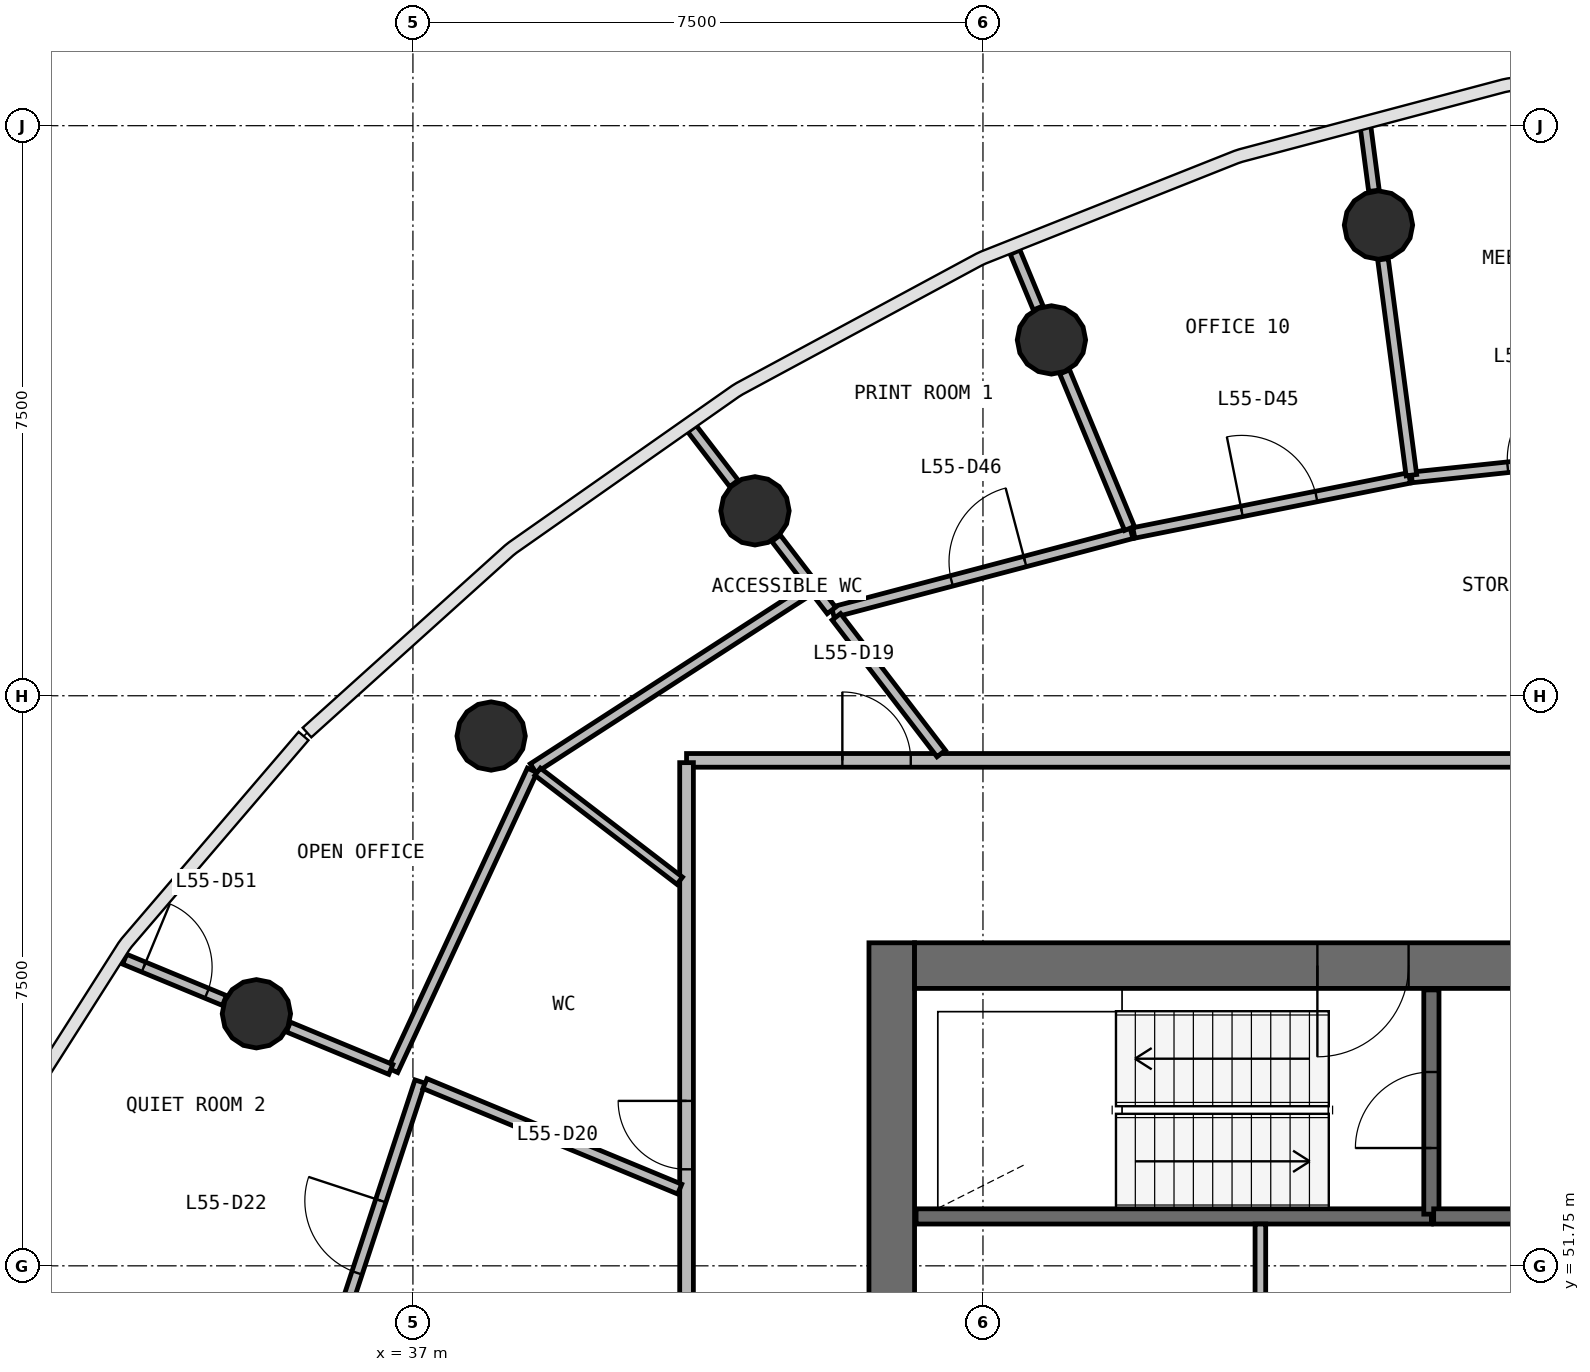
"""IFC4 building model, lengths in metres.
Left out: names, types, materials, properties, quantities, classifications, styles, units other than length and angle.
Written with IfcOpenShell. Run it as: python <this file> out.ifc"""

import sys

from ifc_helpers import new_model, si_unit, direction, frame, frame_2d, origin, origin_2d, place, context, subcontext, project, spatial, rectangle, circle, extrude, source, transform, mapped, element, fill, save


model = new_model("IFC4")
c1 = context("Model", 3, precision=1e-05, world=origin(), true_north=direction((0.0, 1.0)))
c2 = subcontext(c1, "Body", "Model", "MODEL_VIEW")
j1 = project(units=[si_unit("LENGTHUNIT", "METRE"), si_unit("PLANEANGLEUNIT", "RADIAN")], contexts=[c1])
p1 = place(None, origin())
s1 = spatial("IfcSite", under=j1, at=p1, CompositionType="ELEMENT")
p2 = place(p1, origin())
s2 = spatial("IfcBuilding", under=s1, at=p2, CompositionType="ELEMENT")
p3 = place(p2, frame((0.0, 0.0, 226.7)))
s3 = spatial("IfcBuildingStorey", under=s2, at=p3, CompositionType="ELEMENT", Elevation=226.7)
p4 = place(p3, frame((43.3, 56.0, 0.0), z_axis=(0.0, 0.0, 1.0), x_axis=(0.0, -1.0, 0.0)))
e1 = element("IfcWall", 1, at=p4, inside=s3, PredefinedType="SHEAR", context=c2, shape_type="SweptSolid", body=[
    extrude(rectangle(XDim=16.0, YDim=0.6, at=frame_2d((8.0, 0.0))), origin(), (0.0, 0.0, 1.0), 3.9),
])
p5 = place(p4, frame((7.1, 0.0, 0.0)))
e2 = element("IfcOpeningElement", 2, at=p5, cuts=e1, PredefinedType="OPENING", context=c2, shape_type="SweptSolid", body=[
    extrude(rectangle(XDim=1.8, YDim=2.1, at=frame_2d((0.9, 1.05))), frame((0.0, 0.31, 0.0), z_axis=(0.0, -1.0, 0.0), x_axis=(1.0, 0.0, 0.0)), (0.0, 0.0, 1.0), 0.62),
])
p6 = place(p3, frame((60.4, 55.7, 0.0), z_axis=(0.0, 0.0, 1.0), x_axis=(-1.0, 0.0, 0.0)))
e3 = element("IfcWall", 3, at=p6, inside=s3, PredefinedType="SHEAR", context=c2, shape_type="SweptSolid", body=[
    extrude(rectangle(XDim=16.8, YDim=0.6, at=frame_2d((8.4, 0.0))), origin(), (0.0, 0.0, 1.0), 3.9),
])
p7 = place(p6, frame((0.4, 0.0, 0.0)))
e4 = element("IfcOpeningElement", 4, at=p7, cuts=e3, PredefinedType="OPENING", context=c2, shape_type="SweptSolid", body=[
    extrude(rectangle(XDim=1.1, YDim=2.1, at=frame_2d((0.55, 1.05))), frame((0.0, 0.31, 0.0), z_axis=(0.0, -1.0, 0.0), x_axis=(1.0, 0.0, 0.0)), (0.0, 0.0, 1.0), 0.62),
])
p8 = place(p6, frame((10.3, 0.0, 0.0)))
e5 = element("IfcOpeningElement", 5, at=p8, cuts=e3, PredefinedType="OPENING", context=c2, shape_type="SweptSolid", body=[
    extrude(rectangle(XDim=1.2, YDim=2.1, at=frame_2d((0.6, 1.05))), frame((0.0, 0.31, 0.0), z_axis=(0.0, -1.0, 0.0), x_axis=(1.0, 0.0, 0.0)), (0.0, 0.0, 1.0), 0.62),
])
p9 = place(p6, frame((7.25, 0.0, 0.0)))
e6 = element("IfcOpeningElement", 6, at=p9, cuts=e3, PredefinedType="OPENING", context=c2, shape_type="SweptSolid", body=[
    extrude(rectangle(XDim=1.1, YDim=2.1, at=frame_2d((0.55, 1.05))), frame((0.0, 0.31, 0.0), z_axis=(0.0, -1.0, 0.0), x_axis=(1.0, 0.0, 0.0)), (0.0, 0.0, 1.0), 0.62),
])
m1 = source(origin(), c2, "Body", "SweptSolid", [
    extrude(circle(Radius=0.45, at=origin_2d()), origin(), (0.0, 0.0, 1.0), 3.9),
])
for number, where, z_axis, x_axis in (
    (7, (49.704, 65.442, 0.0), (0.0, 0.0, 1.0), (1.0, 0.0, 0.0)),
    (8, (45.401, 63.931, 0.0), (0.0, 0.0, 1.0), (1.0, 0.0, 0.0)),
    (9, (41.501, 61.683, 0.0), (0.0, 0.0, 1.0), (1.0, 0.0, 0.0)),
    (10, (38.029, 58.72, 0.0), (0.0, 0.0, 1.0), (1.0, 0.0, 0.0)),
    (11, (34.941, 55.066, 0.0), (0.0, 0.0, 1.0), (1.0, 0.0, 0.0)),
):
    element("IfcColumn", number, at=place(p3, frame(where, z_axis=z_axis, x_axis=x_axis)), inside=s3, PredefinedType="COLUMN", context=c2, shape_type="MappedRepresentation", body=[
        mapped(m1, transform((0.0, 0.0, 0.0), scale=1.0)),
    ])
p10 = place(p3, frame((43.62, 52.4, 0.0), z_axis=(0.0, 0.0, 1.0), x_axis=(1.0, 0.0, 0.0)))
e12 = element("IfcWall", 12, at=p10, inside=s3, PredefinedType="SOLIDWALL", context=c2, shape_type="SweptSolid", body=[
    extrude(rectangle(XDim=6.78, YDim=0.2, at=frame_2d((3.39, 0.0))), origin(), (0.0, 0.0, 1.0), 3.4),
])
p11 = place(p3, frame((50.4, 52.43, 0.0), z_axis=(0.0, 0.0, 1.0), x_axis=(0.0, 1.0, 0.0)))
e13 = element("IfcWall", 13, at=p11, inside=s3, PredefinedType="SOLIDWALL", context=c2, shape_type="SweptSolid", body=[
    extrude(rectangle(XDim=2.95, YDim=0.2, at=frame_2d((1.475, 0.0))), origin(), (0.0, 0.0, 1.0), 3.4),
])
p12 = place(p11, frame((0.87, 0.0, 0.0)))
e14 = element("IfcOpeningElement", 14, at=p12, cuts=e13, PredefinedType="OPENING", context=c2, shape_type="SweptSolid", body=[
    extrude(rectangle(XDim=1.0, YDim=2.1, at=frame_2d((0.5, 1.05))), frame((0.0, 0.11, 0.0), z_axis=(0.0, -1.0, 0.0), x_axis=(1.0, 0.0, 0.0)), (0.0, 0.0, 1.0), 0.22),
])
p13 = place(p3, frame((50.43, 52.4, 0.0), z_axis=(0.0, 0.0, 1.0), x_axis=(1.0, 0.0, 0.0)))
e15 = element("IfcWall", 15, at=p13, inside=s3, PredefinedType="SOLIDWALL", context=c2, shape_type="SweptSolid", body=[
    extrude(rectangle(XDim=2.24, YDim=0.2, at=frame_2d((1.12, 0.0))), origin(), (0.0, 0.0, 1.0), 3.4),
])
p14 = place(p3, frame((40.6, 58.4, 0.0), z_axis=(0.0, 0.0, 1.0), x_axis=(1.0, 0.0, 0.0)))
e16 = element("IfcWall", 16, at=p14, inside=s3, PredefinedType="PARTITIONING", context=c2, shape_type="SweptSolid", body=[
    extrude(rectangle(XDim=22.8, YDim=0.18, at=frame_2d((11.4, 0.0))), origin(), (0.0, 0.0, 1.0), 2.7),
])
p15 = place(p14, frame((2.05, 0.0, 0.0)))
e17 = element("IfcOpeningElement", 17, at=p15, cuts=e16, PredefinedType="OPENING", context=c2, shape_type="SweptSolid", body=[
    extrude(rectangle(XDim=0.9, YDim=2.1, at=frame_2d((0.45, 1.05))), frame((0.0, 0.1, 0.0), z_axis=(0.0, -1.0, 0.0), x_axis=(1.0, 0.0, 0.0)), (0.0, 0.0, 1.0), 0.2),
])
p16 = place(p14, frame((12.95, 0.0, 0.0)))
e18 = element("IfcOpeningElement", 18, at=p16, cuts=e16, PredefinedType="OPENING", context=c2, shape_type="SweptSolid", body=[
    extrude(rectangle(XDim=1.0, YDim=2.1, at=frame_2d((0.5, 1.05))), frame((0.0, 0.1, 0.0), z_axis=(0.0, -1.0, 0.0), x_axis=(1.0, 0.0, 0.0)), (0.0, 0.0, 1.0), 0.2),
])
p17 = place(p14, frame((10.95, 0.0, 0.0)))
e19 = element("IfcOpeningElement", 19, at=p17, cuts=e16, PredefinedType="OPENING", context=c2, shape_type="SweptSolid", body=[
    extrude(rectangle(XDim=1.0, YDim=2.1, at=frame_2d((0.5, 1.05))), frame((0.0, 0.1, 0.0), z_axis=(0.0, -1.0, 0.0), x_axis=(1.0, 0.0, 0.0)), (0.0, 0.0, 1.0), 0.2),
])
p18 = place(p3, frame((40.6, 37.63, 0.0), z_axis=(0.0, 0.0, 1.0), x_axis=(0.0, 1.0, 0.0)))
e20 = element("IfcWall", 20, at=p18, inside=s3, PredefinedType="PARTITIONING", context=c2, shape_type="SweptSolid", body=[
    extrude(rectangle(XDim=20.74, YDim=0.18, at=frame_2d((10.37, 0.0))), origin(), (0.0, 0.0, 1.0), 2.7),
])
p19 = place(p18, frame((15.39, 0.0, 0.0)))
e21 = element("IfcOpeningElement", 21, at=p19, cuts=e20, PredefinedType="OPENING", context=c2, shape_type="SweptSolid", body=[
    extrude(rectangle(XDim=0.9, YDim=2.1, at=frame_2d((0.45, 1.05))), frame((0.0, 0.1, 0.0), z_axis=(0.0, -1.0, 0.0), x_axis=(1.0, 0.0, 0.0)), (0.0, 0.0, 1.0), 0.2),
])
p20 = place(p18, frame((9.89, 0.0, 0.0)))
e22 = element("IfcOpeningElement", 22, at=p20, cuts=e20, PredefinedType="OPENING", context=c2, shape_type="SweptSolid", body=[
    extrude(rectangle(XDim=1.0, YDim=2.1, at=frame_2d((0.5, 1.05))), frame((0.0, 0.1, 0.0), z_axis=(0.0, -1.0, 0.0), x_axis=(1.0, 0.0, 0.0)), (0.0, 0.0, 1.0), 0.2),
])
p21 = place(p3, frame((42.27, 60.68, 0.0), z_axis=(0.0, 0.0, 1.0), x_axis=(-0.839801255045, -0.542893960202, 0.0)))
e23 = element("IfcWall", 23, at=p21, inside=s3, PredefinedType="PARTITIONING", context=c2, shape_type="SweptSolid", body=[
    extrude(rectangle(XDim=4.392, YDim=0.14, at=frame_2d((2.196, 0.0))), origin(), (0.0, 0.0, 1.0), 2.7),
])
p22 = place(p3, frame((38.569, 58.269, 0.0), z_axis=(0.0, 0.0, 1.0), x_axis=(-0.421127790684, -0.907001314174, 0.0)))
e24 = element("IfcWall", 24, at=p22, inside=s3, PredefinedType="PARTITIONING", context=c2, shape_type="SweptSolid", body=[
    extrude(rectangle(XDim=4.352, YDim=0.14, at=frame_2d((2.176, 0.0))), origin(), (0.0, 0.0, 1.0), 2.7),
])
p23 = place(p3, frame((35.774, 50.166, 0.0), z_axis=(0.0, 0.0, 1.0), x_axis=(0.312511306012, 0.949914040119, 0.0)))
e25 = element("IfcWall", 25, at=p23, inside=s3, PredefinedType="PARTITIONING", context=c2, shape_type="SweptSolid", body=[
    extrude(rectangle(XDim=4.22, YDim=0.14, at=frame_2d((2.11, 0.0))), origin(), (0.0, 0.0, 1.0), 2.7),
])
p24 = place(p23, frame((1.57, 0.0, 0.0)))
e26 = element("IfcOpeningElement", 26, at=p24, cuts=e25, PredefinedType="OPENING", context=c2, shape_type="SweptSolid", body=[
    extrude(rectangle(XDim=1.0, YDim=2.1, at=frame_2d((0.5, 1.05))), frame((0.0, 0.08, 0.0), z_axis=(0.0, -1.0, 0.0), x_axis=(1.0, 0.0, 0.0)), (0.0, 0.0, 1.0), 0.16),
])
p25 = place(p3, frame((42.524, 60.349, 0.0), z_axis=(0.0, 0.0, 1.0), x_axis=(0.966913320751, 0.255105135492, 0.0)))
e27 = element("IfcWall", 27, at=p25, inside=s3, PredefinedType="PARTITIONING", context=c2, shape_type="SweptSolid", body=[
    extrude(rectangle(XDim=4.065, YDim=0.14, at=frame_2d((2.033, 0.0))), origin(), (0.0, 0.0, 1.0), 2.7),
])
p26 = place(p25, frame((1.615, 0.0, 0.0)))
e28 = element("IfcOpeningElement", 28, at=p26, cuts=e27, PredefinedType="OPENING", context=c2, shape_type="SweptSolid", body=[
    extrude(rectangle(XDim=1.0, YDim=2.1, at=frame_2d((0.5, 1.05))), frame((0.0, 0.08, 0.0), z_axis=(0.0, -1.0, 0.0), x_axis=(1.0, 0.0, 0.0)), (0.0, 0.0, 1.0), 0.16),
])
p27 = place(p3, frame((40.51, 52.759, 0.0), z_axis=(0.0, 0.0, 1.0), x_axis=(-0.923873298868, 0.382698481365, 0.0)))
e29 = element("IfcWall", 29, at=p27, inside=s3, PredefinedType="PARTITIONING", context=c2, shape_type="SweptSolid", body=[
    extrude(rectangle(XDim=3.628, YDim=0.14, at=frame_2d((1.814, 0.0))), origin(), (0.0, 0.0, 1.0), 2.7),
])
p28 = place(p3, frame((50.141, 62.122, 0.0), z_axis=(0.0, 0.0, 1.0), x_axis=(0.994443424191, 0.105272389942, 0.0)))
e30 = element("IfcWall", 30, at=p28, inside=s3, PredefinedType="PARTITIONING", context=c2, shape_type="SweptSolid", body=[
    extrude(rectangle(XDim=3.72, YDim=0.14, at=frame_2d((1.86, 0.0))), origin(), (0.0, 0.0, 1.0), 2.7),
])
p29 = place(p28, frame((1.27, 0.0, 0.0)))
e31 = element("IfcOpeningElement", 31, at=p29, cuts=e30, PredefinedType="OPENING", context=c2, shape_type="SweptSolid", body=[
    extrude(rectangle(XDim=1.0, YDim=2.1, at=frame_2d((0.5, 1.05))), frame((0.0, 0.08, 0.0), z_axis=(0.0, -1.0, 0.0), x_axis=(1.0, 0.0, 0.0)), (0.0, 0.0, 1.0), 0.16),
])
p30 = place(p3, frame((46.485, 61.392, 0.0), z_axis=(0.0, 0.0, 1.0), x_axis=(0.980631422481, 0.195862230259, 0.0)))
e32 = element("IfcWall", 32, at=p30, inside=s3, PredefinedType="PARTITIONING", context=c2, shape_type="SweptSolid", body=[
    extrude(rectangle(XDim=3.698, YDim=0.14, at=frame_2d((1.849, 0.0))), origin(), (0.0, 0.0, 1.0), 2.7),
])
p31 = place(p30, frame((1.448, 0.0, 0.0)))
e33 = element("IfcOpeningElement", 33, at=p31, cuts=e32, PredefinedType="OPENING", context=c2, shape_type="SweptSolid", body=[
    extrude(rectangle(XDim=1.0, YDim=2.1, at=frame_2d((0.5, 1.05))), frame((0.0, 0.08, 0.0), z_axis=(0.0, -1.0, 0.0), x_axis=(1.0, 0.0, 0.0)), (0.0, 0.0, 1.0), 0.16),
])
p32 = place(p3, frame((50.137, 62.152, 0.0), z_axis=(0.0, 0.0, 1.0), x_axis=(-0.130577981436, 0.991438041818, 0.0)))
e34 = element("IfcWall", 34, at=p32, inside=s3, PredefinedType="PARTITIONING", context=c2, shape_type="SweptSolid", body=[
    extrude(rectangle(XDim=2.864, YDim=0.14, at=frame_2d((1.432, 0.0))), origin(), (0.0, 0.0, 1.0), 2.7),
])
p33 = place(p3, frame((43.951, 58.49, 0.0), z_axis=(0.0, 0.0, 1.0), x_axis=(-0.608700561504, 0.793400041861, 0.0)))
e35 = element("IfcWall", 35, at=p33, inside=s3, PredefinedType="PARTITIONING", context=c2, shape_type="SweptSolid", body=[
    extrude(rectangle(XDim=2.267, YDim=0.14, at=frame_2d((1.133, 0.0))), origin(), (0.0, 0.0, 1.0), 2.7),
])
p34 = place(p3, frame((48.15, 50.01, 0.0), z_axis=(0.0, 0.0, 1.0), x_axis=(0.0, 1.0, 0.0)))
e36 = element("IfcWall", 36, at=p34, inside=s3, PredefinedType="PARTITIONING", context=c2, shape_type="SweptSolid", body=[
    extrude(rectangle(XDim=2.29, YDim=0.14, at=frame_2d((1.145, 0.0))), origin(), (0.0, 0.0, 1.0), 2.7),
])
p35 = place(p3, frame((46.428, 61.451, 0.0), z_axis=(0.0, 0.0, 1.0), x_axis=(-0.382654863797, 0.923891365482, 0.0)))
e37 = element("IfcWall", 37, at=p35, inside=s3, PredefinedType="PARTITIONING", context=c2, shape_type="SweptSolid", body=[
    extrude(rectangle(XDim=2.229, YDim=0.14, at=frame_2d((1.115, 0.0))), origin(), (0.0, 0.0, 1.0), 2.7),
])
p36 = place(p3, frame((36.709, 54.334, 0.0), z_axis=(0.0, 0.0, 1.0), x_axis=(-0.923872023258, 0.382701560803, 0.0)))
e38 = element("IfcWall", 38, at=p36, inside=s3, PredefinedType="PARTITIONING", context=c2, shape_type="SweptSolid", body=[
    extrude(rectangle(XDim=1.459, YDim=0.14, at=frame_2d((0.729, 0.0))), origin(), (0.0, 0.0, 1.0), 2.7),
])
p37 = place(p3, frame((33.207, 55.784, 0.0), z_axis=(0.0, 0.0, 1.0), x_axis=(0.923908003556, -0.382614689949, 0.0)))
e39 = element("IfcWall", 39, at=p37, inside=s3, PredefinedType="PARTITIONING", context=c2, shape_type="SweptSolid", body=[
    extrude(rectangle(XDim=1.422, YDim=0.14, at=frame_2d((0.711, 0.0))), origin(), (0.0, 0.0, 1.0), 2.7),
])
p38 = place(p37, frame((0.272, 0.0, 0.0)))
e40 = element("IfcOpeningElement", 40, at=p38, cuts=e39, PredefinedType="OPENING", context=c2, shape_type="SweptSolid", body=[
    extrude(rectangle(XDim=0.9, YDim=2.1, at=frame_2d((0.45, 1.05))), frame((0.0, 0.08, 0.0), z_axis=(0.0, -1.0, 0.0), x_axis=(1.0, 0.0, 0.0)), (0.0, 0.0, 1.0), 0.16),
])
p39 = place(p3, frame((41.224, 62.044, 0.0), z_axis=(0.0, 0.0, 1.0), x_axis=(-0.608826656725, 0.793303285044, 0.0)))
e41 = element("IfcWall", 41, at=p39, inside=s3, PredefinedType="PARTITIONING", context=c2, shape_type="SweptSolid", body=[
    extrude(rectangle(XDim=0.908, YDim=0.14, at=frame_2d((0.454, 0.0))), origin(), (0.0, 0.0, 1.0), 2.7),
])
p40 = place(p3, frame((49.644, 65.893, 0.0), z_axis=(0.0, 0.0, 1.0), x_axis=(-0.130469380283, 0.991452339151, 0.0)))
e42 = element("IfcWall", 42, at=p40, inside=s3, PredefinedType="PARTITIONING", context=c2, shape_type="SweptSolid", body=[
    extrude(rectangle(XDim=0.85, YDim=0.14, at=frame_2d((0.425, 0.0))), origin(), (0.0, 0.0, 1.0), 2.7),
])
p41 = place(p3, frame((42.227, 60.736, 0.0), z_axis=(0.0, 0.0, 1.0), x_axis=(-0.608736601205, 0.793372390718, 0.0)))
e43 = element("IfcWall", 43, at=p41, inside=s3, PredefinedType="PARTITIONING", context=c2, shape_type="SweptSolid", body=[
    extrude(rectangle(XDim=0.739, YDim=0.14, at=frame_2d((0.37, 0.0))), origin(), (0.0, 0.0, 1.0), 2.7),
])
p42 = place(p3, frame((45.227, 64.352, 0.0), z_axis=(0.0, 0.0, 1.0), x_axis=(-0.382631826792, 0.923900906551, 0.0)))
e44 = element("IfcWall", 44, at=p42, inside=s3, PredefinedType="PARTITIONING", context=c2, shape_type="SweptSolid", body=[
    extrude(rectangle(XDim=0.796, YDim=0.14, at=frame_2d((0.398, 0.0))), origin(), (0.0, 0.0, 1.0), 2.7),
])
p43 = place(p3, frame((42.506, 60.373, 0.0), z_axis=(0.0, 0.0, 1.0), x_axis=(-0.609018395773, 0.793156096623, 0.0)))
e45 = element("IfcWall", 45, at=p43, inside=s3, PredefinedType="PARTITIONING", context=c2, shape_type="SweptSolid", body=[
    extrude(rectangle(XDim=0.358, YDim=0.14, at=frame_2d((0.179, 0.0))), origin(), (0.0, 0.0, 1.0), 2.7),
])
p44 = place(p3, frame((40.51, 56.817, 0.0), z_axis=(0.0, 0.0, 1.0), x_axis=(-0.793374494853, 0.608733858856, 0.0)))
e46 = element("IfcWall", 46, at=p44, inside=s3, PredefinedType="PARTITIONING", context=c2, shape_type="SweptSolid", body=[
    extrude(rectangle(XDim=2.356, YDim=0.12, at=frame_2d((1.178, 0.0))), origin(), (0.0, 0.0, 1.0), 2.7),
])
m2 = source(origin(), c2, "Body", "SweptSolid", [
    extrude(rectangle(XDim=1.2, YDim=2.1, at=frame_2d((0.6, 1.05))), frame((0.0, 0.025, 0.0), z_axis=(0.0, -1.0, 0.0), x_axis=(1.0, 0.0, 0.0)), (0.0, 0.0, 1.0), 0.05),
])
p45 = place(p8, origin())
e47 = element("IfcDoor", 47, at=p45, inside=s3, OperationType="SINGLE_SWING_RIGHT", PredefinedType="DOOR", context=c2, shape_type="MappedRepresentation", body=[
    mapped(m2, transform((0.0, 0.0, 0.0), scale=1.0)),
])
fill(e5, e47)
m3 = source(origin(), c2, "Body", "SweptSolid", [
    extrude(rectangle(XDim=1.0, YDim=2.1, at=frame_2d((0.5, 1.05))), frame((0.0, 0.025, 0.0), z_axis=(0.0, -1.0, 0.0), x_axis=(1.0, 0.0, 0.0)), (0.0, 0.0, 1.0), 0.05),
])
p46 = place(p12, origin())
e48 = element("IfcDoor", 48, at=p46, inside=s3, OperationType="SINGLE_SWING_LEFT", PredefinedType="DOOR", context=c2, shape_type="MappedRepresentation", body=[
    mapped(m3, transform((0.0, 0.0, 0.0), scale=1.0)),
])
fill(e14, e48)
m4 = source(origin(), c2, "Body", "SweptSolid", [
    extrude(rectangle(XDim=0.9, YDim=2.1, at=frame_2d((0.45, 1.05))), frame((0.0, 0.025, 0.0), z_axis=(0.0, -1.0, 0.0), x_axis=(1.0, 0.0, 0.0)), (0.0, 0.0, 1.0), 0.05),
])
p47 = place(p15, origin())
e49 = element("IfcDoor", 49, at=p47, inside=s3, OperationType="SINGLE_SWING_LEFT", PredefinedType="DOOR", context=c2, shape_type="MappedRepresentation", body=[
    mapped(m4, transform((0.0, 0.0, 0.0), scale=1.0)),
])
fill(e17, e49)
p48 = place(p19, origin())
e50 = element("IfcDoor", 50, at=p48, inside=s3, OperationType="SINGLE_SWING_RIGHT", PredefinedType="DOOR", context=c2, shape_type="MappedRepresentation", body=[
    mapped(m4, transform((0.0, 0.0, 0.0), scale=1.0)),
])
fill(e21, e50)
m5 = source(origin(), c2, "Body", "SweptSolid", [
    extrude(rectangle(XDim=1.0, YDim=2.1, at=frame_2d((0.5, 1.05))), frame((0.0, 0.025, 0.0), z_axis=(0.0, -1.0, 0.0), x_axis=(1.0, 0.0, 0.0)), (0.0, 0.0, 1.0), 0.05),
])
p49 = place(p24, origin())
e51 = element("IfcDoor", 51, at=p49, inside=s3, OperationType="SINGLE_SWING_RIGHT", PredefinedType="DOOR", context=c2, shape_type="MappedRepresentation", body=[
    mapped(m5, transform((0.0, 0.0, 0.0), scale=1.0)),
])
fill(e26, e51)
p50 = place(p29, origin())
e52 = element("IfcDoor", 52, at=p50, inside=s3, OperationType="SINGLE_SWING_RIGHT", PredefinedType="DOOR", context=c2, shape_type="MappedRepresentation", body=[
    mapped(m5, transform((0.0, 0.0, 0.0), scale=1.0)),
])
fill(e31, e52)
p51 = place(p31, origin())
e53 = element("IfcDoor", 53, at=p51, inside=s3, OperationType="SINGLE_SWING_LEFT", PredefinedType="DOOR", context=c2, shape_type="MappedRepresentation", body=[
    mapped(m5, transform((0.0, 0.0, 0.0), scale=1.0)),
])
fill(e33, e53)
p52 = place(p26, origin())
e54 = element("IfcDoor", 54, at=p52, inside=s3, OperationType="SINGLE_SWING_RIGHT", PredefinedType="DOOR", context=c2, shape_type="MappedRepresentation", body=[
    mapped(m5, transform((0.0, 0.0, 0.0), scale=1.0)),
])
fill(e28, e54)
m6 = source(origin(), c2, "Body", "SweptSolid", [
    extrude(rectangle(XDim=0.9, YDim=2.1, at=frame_2d((0.45, 1.05))), frame((0.0, 0.025, 0.0), z_axis=(0.0, -1.0, 0.0), x_axis=(1.0, 0.0, 0.0)), (0.0, 0.0, 1.0), 0.05),
])
p53 = place(p38, origin())
e55 = element("IfcDoor", 55, at=p53, inside=s3, OperationType="SINGLE_SWING_LEFT", PredefinedType="DOOR", context=c2, shape_type="MappedRepresentation", body=[
    mapped(m6, transform((0.0, 0.0, 0.0), scale=1.0)),
])
fill(e40, e55)
save(model, sys.argv[1])
